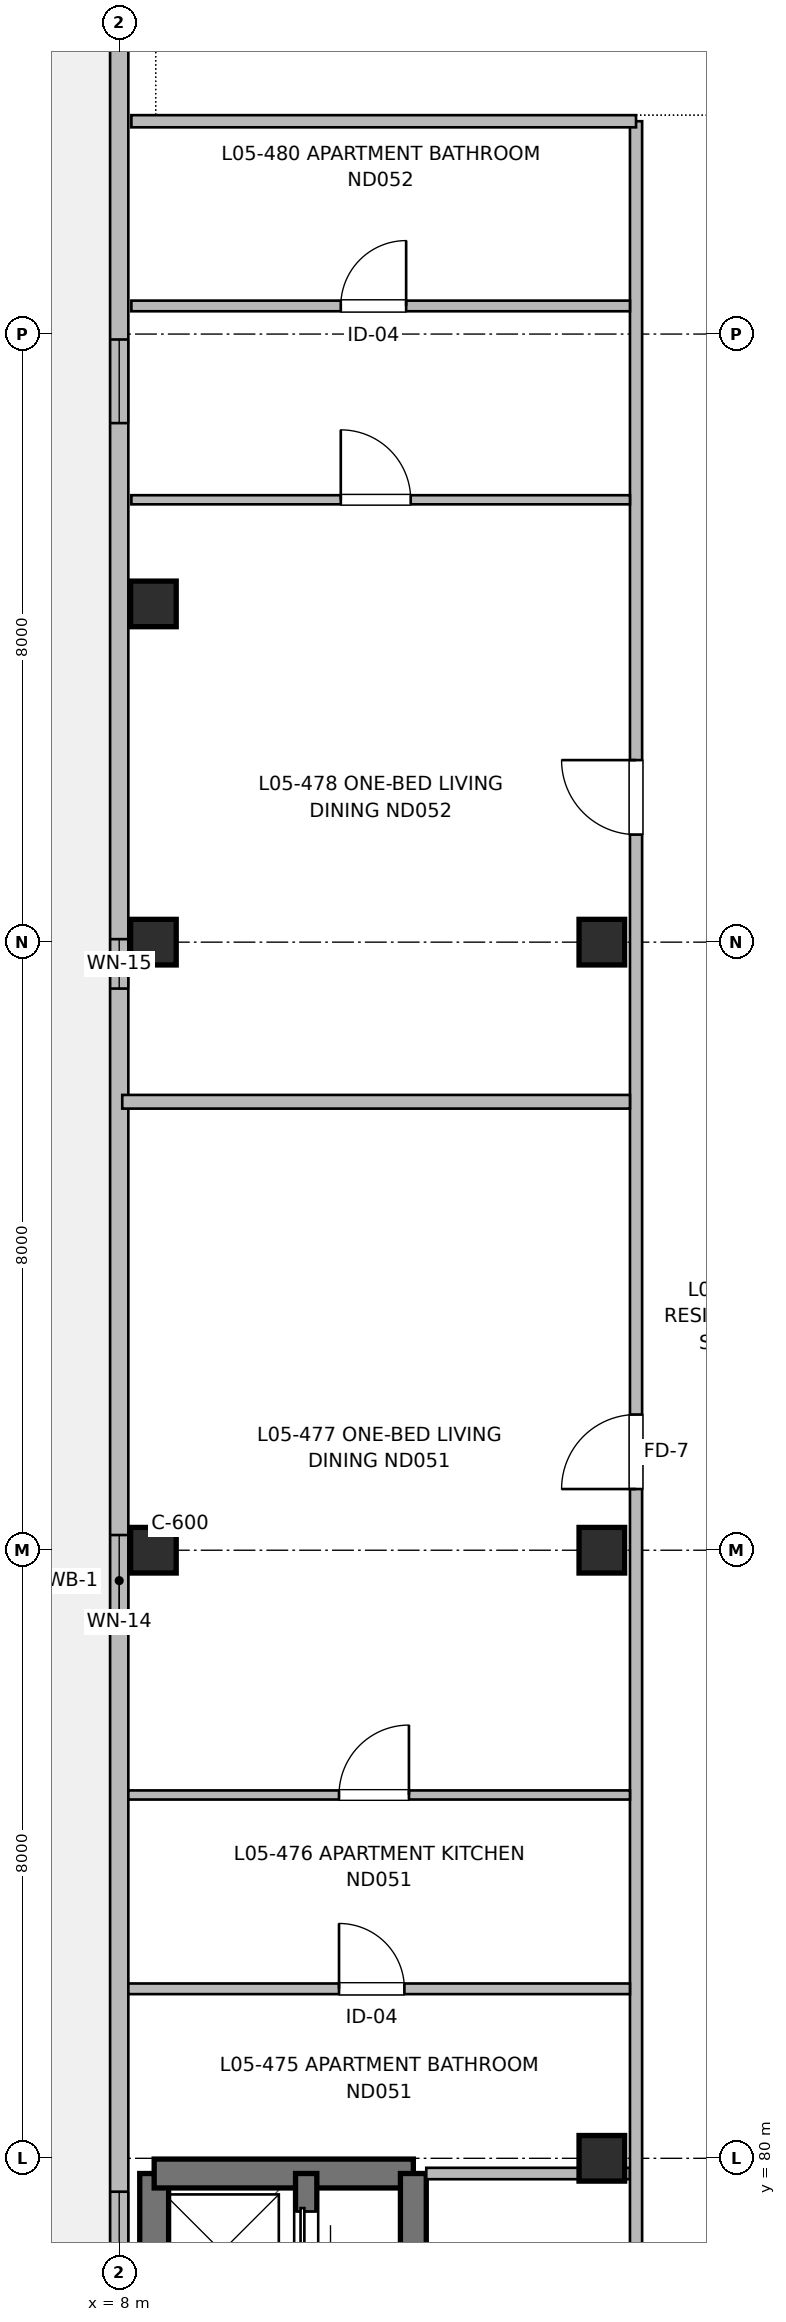
"""IFC4 building model, lengths in metres.
Left out: names, types, materials, properties, quantities, classifications, styles, units other than length and angle.
Written with IfcOpenShell. Run it as: python <this file> out.ifc"""

import sys

from ifc_helpers import new_model, si_unit, direction, frame, frame_2d, origin, origin_2d, place, context, subcontext, project, spatial, rectangle, extrude, element, fill, save


model = new_model("IFC4")
c1 = context("Model", 3, precision=1e-05, world=origin(), true_north=direction((0.0, 1.0)))
c2 = subcontext(c1, "Body", "Model", "MODEL_VIEW")
j1 = project(units=[si_unit("LENGTHUNIT", "METRE"), si_unit("PLANEANGLEUNIT", "RADIAN")], contexts=[c1])
p1 = place(None, origin())
s1 = spatial("IfcSite", under=j1, at=p1, CompositionType="ELEMENT")
p2 = place(p1, origin())
s2 = spatial("IfcBuilding", under=s1, at=p2, CompositionType="ELEMENT")
p3 = place(p2, frame((0.0, 0.0, 16.96)))
s3 = spatial("IfcBuildingStorey", under=s2, at=p3, CompositionType="ELEMENT", Elevation=16.96)
for number, where, z_axis, x_axis in (
    (1, (8.45, 88.0, 0.0), (0.0, 0.0, 1.0), (1.0, 0.0, 0.0)),
    (2, (8.45, 96.0, 0.0), (0.0, 0.0, 1.0), (1.0, 0.0, 0.0)),
    (3, (8.45, 100.45, 0.0), (0.0, 0.0, 1.0), (1.0, 0.0, 0.0)),
    (4, (14.35, 80.0, 0.0), (0.0, 0.0, 1.0), (1.0, 0.0, 0.0)),
    (5, (14.35, 88.0, 0.0), (0.0, 0.0, 1.0), (1.0, 0.0, 0.0)),
    (6, (14.35, 96.0, 0.0), (0.0, 0.0, 1.0), (1.0, 0.0, 0.0)),
):
    element("IfcColumn", number, at=place(p3, frame(where, z_axis=z_axis, x_axis=x_axis)), inside=s3, PredefinedType="COLUMN", context=c2, shape_type="SweptSolid", body=[
        extrude(rectangle(XDim=0.6, YDim=0.6, at=origin_2d()), origin(), (0.0, 0.0, 1.0), 3.2),
    ])
p4 = place(p3, frame((8.46, 67.35, 0.0), z_axis=(0.0, 0.0, 1.0), x_axis=(0.0, 1.0, 0.0)))
e7 = element("IfcWall", 7, at=p4, inside=s3, PredefinedType="SHEAR", context=c2, shape_type="SweptSolid", body=[
    extrude(rectangle(XDim=12.45, YDim=0.38, at=frame_2d((6.225, 0.0))), origin(), (0.0, 0.0, 1.0), 3.2),
])
p5 = place(p4, frame((2.2, 0.0, 0.97)))
e8 = element("IfcOpeningElement", 8, at=p5, cuts=e7, PredefinedType="OPENING", context=c2, shape_type="SweptSolid", body=[
    extrude(rectangle(XDim=0.95, YDim=1.25, at=frame_2d((0.475, 0.625))), frame((0.0, 0.2, 0.0), z_axis=(0.0, -1.0, 0.0), x_axis=(1.0, 0.0, 0.0)), (0.0, 0.0, 1.0), 0.4),
])
p6 = place(p3, frame((8.46, 79.8, 0.0), z_axis=(0.0, 0.0, 1.0), x_axis=(1.0, 0.0, 0.0)))
e9 = element("IfcWall", 9, at=p6, inside=s3, PredefinedType="SHEAR", context=c2, shape_type="SweptSolid", body=[
    extrude(rectangle(XDim=3.41, YDim=0.38, at=frame_2d((1.705, 0.0))), origin(), (0.0, 0.0, 1.0), 3.2),
])
p7 = place(p3, frame((11.87, 79.8, 0.0), z_axis=(0.0, 0.0, 1.0), x_axis=(0.0, -1.0, 0.0)))
e10 = element("IfcWall", 10, at=p7, inside=s3, PredefinedType="SHEAR", context=c2, shape_type="SweptSolid", body=[
    extrude(rectangle(XDim=12.45, YDim=0.34, at=frame_2d((6.225, 0.0))), origin(), (0.0, 0.0, 1.0), 3.2),
])
p8 = place(p7, frame((10.85, 0.0, 0.0)))
e11 = element("IfcOpeningElement", 11, at=p8, cuts=e10, PredefinedType="OPENING", context=c2, shape_type="SweptSolid", body=[
    extrude(rectangle(XDim=1.05, YDim=2.15, at=frame_2d((0.525, 1.075))), frame((0.0, 0.18, 0.0), z_axis=(0.0, -1.0, 0.0), x_axis=(1.0, 0.0, 0.0)), (0.0, 0.0, 1.0), 0.36),
])
p9 = place(p3, frame((10.46, 74.55, 0.0), z_axis=(0.0, 0.0, 1.0), x_axis=(0.0, 1.0, 0.0)))
e12 = element("IfcWall", 12, at=p9, inside=s3, PredefinedType="SHEAR", context=c2, shape_type="SweptSolid", body=[
    extrude(rectangle(XDim=5.25, YDim=0.28, at=frame_2d((2.625, 0.0))), origin(), (0.0, 0.0, 1.0), 3.2),
])
p10 = place(p9, frame((1.15, 0.0, 0.0)))
e13 = element("IfcOpeningElement", 13, at=p10, cuts=e12, PredefinedType="OPENING", context=c2, shape_type="SweptSolid", body=[
    extrude(rectangle(XDim=1.0, YDim=2.15, at=frame_2d((0.5, 1.075))), frame((0.0, 0.15, 0.0), z_axis=(0.0, -1.0, 0.0), x_axis=(1.0, 0.0, 0.0)), (0.0, 0.0, 1.0), 0.3),
])
p11 = place(p9, frame((3.85, 0.0, 0.0)))
e14 = element("IfcOpeningElement", 14, at=p11, cuts=e12, PredefinedType="OPENING", context=c2, shape_type="SweptSolid", body=[
    extrude(rectangle(XDim=0.9, YDim=2.15, at=frame_2d((0.45, 1.075))), frame((0.0, 0.15, 0.0), z_axis=(0.0, -1.0, 0.0), x_axis=(1.0, 0.0, 0.0)), (0.0, 0.0, 1.0), 0.3),
])
p12 = place(p3, frame((8.0, 59.2, 0.0), z_axis=(0.0, 0.0, 1.0), x_axis=(0.0, 1.0, 0.0)))
e15 = element("IfcWall", 15, at=p12, inside=s3, PredefinedType="SOLIDWALL", context=c2, shape_type="SweptSolid", body=[
    extrude(rectangle(XDim=56.8, YDim=0.24, at=frame_2d((28.4, 0.0))), origin(), (0.0, 0.0, 1.0), 2.98),
])
p13 = place(p12, frame((2.657, 0.0, 0.0)))
e16 = element("IfcOpeningElement", 16, at=p13, cuts=e15, PredefinedType="OPENING", context=c2, shape_type="SweptSolid", body=[
    extrude(rectangle(XDim=1.2, YDim=2.2, at=frame_2d((0.6, 1.1))), frame((0.0, 0.13, 0.0), z_axis=(0.0, -1.0, 0.0), x_axis=(1.0, 0.0, 0.0)), (0.0, 0.0, 1.0), 0.26),
])
p14 = place(p12, frame((5.357, 0.0, 0.62)))
e17 = element("IfcOpeningElement", 17, at=p14, cuts=e15, PredefinedType="OPENING", context=c2, shape_type="SweptSolid", body=[
    extrude(rectangle(XDim=1.1, YDim=1.6, at=frame_2d((0.55, 0.8))), frame((0.0, 0.13, 0.0), z_axis=(0.0, -1.0, 0.0), x_axis=(1.0, 0.0, 0.0)), (0.0, 0.0, 1.0), 0.26),
])
p15 = place(p12, frame((11.046, 0.0, 0.72)))
e18 = element("IfcOpeningElement", 18, at=p15, cuts=e15, PredefinedType="OPENING", context=c2, shape_type="SweptSolid", body=[
    extrude(rectangle(XDim=2.25, YDim=1.5, at=frame_2d((1.125, 0.75))), frame((0.0, 0.13, 0.0), z_axis=(0.0, -1.0, 0.0), x_axis=(1.0, 0.0, 0.0)), (0.0, 0.0, 1.0), 0.26),
])
p16 = place(p12, frame((19.311, 0.0, 0.9)))
e19 = element("IfcOpeningElement", 19, at=p16, cuts=e15, PredefinedType="OPENING", context=c2, shape_type="SweptSolid", body=[
    extrude(rectangle(XDim=1.05, YDim=1.15, at=frame_2d((0.525, 0.575))), frame((0.0, 0.13, 0.0), z_axis=(0.0, -1.0, 0.0), x_axis=(1.0, 0.0, 0.0)), (0.0, 0.0, 1.0), 0.26),
])
p17 = place(p12, frame((27.8, 0.0, 0.9)))
e20 = element("IfcOpeningElement", 20, at=p17, cuts=e15, PredefinedType="OPENING", context=c2, shape_type="SweptSolid", body=[
    extrude(rectangle(XDim=1.2, YDim=1.05, at=frame_2d((0.6, 0.525))), frame((0.0, 0.13, 0.0), z_axis=(0.0, -1.0, 0.0), x_axis=(1.0, 0.0, 0.0)), (0.0, 0.0, 1.0), 0.26),
])
p18 = place(p12, frame((36.189, 0.0, 0.9)))
e21 = element("IfcOpeningElement", 21, at=p18, cuts=e15, PredefinedType="OPENING", context=c2, shape_type="SweptSolid", body=[
    extrude(rectangle(XDim=0.65, YDim=0.95, at=frame_2d((0.325, 0.475))), frame((0.0, 0.13, 0.0), z_axis=(0.0, -1.0, 0.0), x_axis=(1.0, 0.0, 0.0)), (0.0, 0.0, 1.0), 0.26),
])
p19 = place(p12, frame((43.629, 0.0, 0.62)))
e22 = element("IfcOpeningElement", 22, at=p19, cuts=e15, PredefinedType="OPENING", context=c2, shape_type="SweptSolid", body=[
    extrude(rectangle(XDim=1.1, YDim=1.6, at=frame_2d((0.55, 0.8))), frame((0.0, 0.13, 0.0), z_axis=(0.0, -1.0, 0.0), x_axis=(1.0, 0.0, 0.0)), (0.0, 0.0, 1.0), 0.26),
])
p20 = place(p12, frame((52.693, 0.0, 0.47)))
e23 = element("IfcOpeningElement", 23, at=p20, cuts=e15, PredefinedType="OPENING", context=c2, shape_type="SweptSolid", body=[
    extrude(rectangle(XDim=2.7, YDim=1.75, at=frame_2d((1.35, 0.875))), frame((0.0, 0.13, 0.0), z_axis=(0.0, -1.0, 0.0), x_axis=(1.0, 0.0, 0.0)), (0.0, 0.0, 1.0), 0.26),
])
p21 = place(p3, frame((12.04, 79.8, 0.0), z_axis=(0.0, 0.0, 1.0), x_axis=(1.0, 0.0, 0.0)))
e24 = element("IfcWall", 24, at=p21, inside=s3, PredefinedType="PARTITIONING", context=c2, shape_type="SweptSolid", body=[
    extrude(rectangle(XDim=2.68, YDim=0.15, at=frame_2d((1.34, 0.0))), origin(), (0.0, 0.0, 1.0), 2.935),
])
p22 = place(p3, frame((14.8, 59.36, 0.0), z_axis=(0.0, 0.0, 1.0), x_axis=(0.0, 1.0, 0.0)))
e25 = element("IfcWall", 25, at=p22, inside=s3, PredefinedType="PARTITIONING", context=c2, shape_type="SweptSolid", body=[
    extrude(rectangle(XDim=47.44, YDim=0.16, at=frame_2d((23.72, 0.0))), origin(), (0.0, 0.0, 1.0), 2.935),
])
p23 = place(p22, frame((9.64, 0.0, 0.0)))
e26 = element("IfcOpeningElement", 26, at=p23, cuts=e25, PredefinedType="OPENING", context=c2, shape_type="SweptSolid", body=[
    extrude(rectangle(XDim=1.1, YDim=2.15, at=frame_2d((0.55, 1.075))), frame((0.0, 0.09, 0.0), z_axis=(0.0, -1.0, 0.0), x_axis=(1.0, 0.0, 0.0)), (0.0, 0.0, 1.0), 0.18),
])
p24 = place(p22, frame((16.04, 0.0, 0.0)))
e27 = element("IfcOpeningElement", 27, at=p24, cuts=e25, PredefinedType="OPENING", context=c2, shape_type="SweptSolid", body=[
    extrude(rectangle(XDim=1.6, YDim=2.15, at=frame_2d((0.8, 1.075))), frame((0.0, 0.09, 0.0), z_axis=(0.0, -1.0, 0.0), x_axis=(1.0, 0.0, 0.0)), (0.0, 0.0, 1.0), 0.18),
])
p25 = place(p22, frame((1.8, 0.0, 0.0)))
e28 = element("IfcOpeningElement", 28, at=p25, cuts=e25, PredefinedType="OPENING", context=c2, shape_type="SweptSolid", body=[
    extrude(rectangle(XDim=0.96, YDim=2.15, at=frame_2d((0.48, 1.075))), frame((0.0, 0.09, 0.0), z_axis=(0.0, -1.0, 0.0), x_axis=(1.0, 0.0, 0.0)), (0.0, 0.0, 1.0), 0.18),
])
p26 = place(p22, frame((29.445, 0.0, 0.0)))
e29 = element("IfcOpeningElement", 29, at=p26, cuts=e25, PredefinedType="OPENING", context=c2, shape_type="SweptSolid", body=[
    extrude(rectangle(XDim=0.98, YDim=2.15, at=frame_2d((0.49, 1.075))), frame((0.0, 0.09, 0.0), z_axis=(0.0, -1.0, 0.0), x_axis=(1.0, 0.0, 0.0)), (0.0, 0.0, 1.0), 0.18),
])
p27 = place(p22, frame((38.055, 0.0, 0.0)))
e30 = element("IfcOpeningElement", 30, at=p27, cuts=e25, PredefinedType="OPENING", context=c2, shape_type="SweptSolid", body=[
    extrude(rectangle(XDim=0.98, YDim=2.15, at=frame_2d((0.49, 1.075))), frame((0.0, 0.09, 0.0), z_axis=(0.0, -1.0, 0.0), x_axis=(1.0, 0.0, 0.0)), (0.0, 0.0, 1.0), 0.18),
])
p28 = place(p3, frame((8.16, 106.8, 0.0), z_axis=(0.0, 0.0, 1.0), x_axis=(1.0, 0.0, 0.0)))
e31 = element("IfcWall", 31, at=p28, inside=s3, PredefinedType="PARTITIONING", context=c2, shape_type="SweptSolid", body=[
    extrude(rectangle(XDim=6.64, YDim=0.16, at=frame_2d((3.32, 0.0))), origin(), (0.0, 0.0, 1.0), 2.935),
])
p29 = place(p3, frame((8.04, 93.9, 0.0), z_axis=(0.0, 0.0, 1.0), x_axis=(1.0, 0.0, 0.0)))
e32 = element("IfcWall", 32, at=p29, inside=s3, PredefinedType="PARTITIONING", context=c2, shape_type="SweptSolid", body=[
    extrude(rectangle(XDim=6.68, YDim=0.18, at=frame_2d((3.34, 0.0))), origin(), (0.0, 0.0, 1.0), 2.935),
])
p30 = place(p3, frame((8.12, 82.23, 0.0), z_axis=(0.0, 0.0, 1.0), x_axis=(1.0, 0.0, 0.0)))
e33 = element("IfcWall", 33, at=p30, inside=s3, PredefinedType="PARTITIONING", context=c2, shape_type="SweptSolid", body=[
    extrude(rectangle(XDim=6.6, YDim=0.14, at=frame_2d((3.3, 0.0))), origin(), (0.0, 0.0, 1.0), 2.935),
])
p31 = place(p30, frame((2.772, 0.0, 0.0)))
e34 = element("IfcOpeningElement", 34, at=p31, cuts=e33, PredefinedType="OPENING", context=c2, shape_type="SweptSolid", body=[
    extrude(rectangle(XDim=0.86, YDim=2.1, at=frame_2d((0.43, 1.05))), frame((0.0, 0.08, 0.0), z_axis=(0.0, -1.0, 0.0), x_axis=(1.0, 0.0, 0.0)), (0.0, 0.0, 1.0), 0.16),
])
p32 = place(p3, frame((8.12, 84.78, 0.0), z_axis=(0.0, 0.0, 1.0), x_axis=(1.0, 0.0, 0.0)))
e35 = element("IfcWall", 35, at=p32, inside=s3, PredefinedType="PARTITIONING", context=c2, shape_type="SweptSolid", body=[
    extrude(rectangle(XDim=6.6, YDim=0.12, at=frame_2d((3.3, 0.0))), origin(), (0.0, 0.0, 1.0), 2.935),
])
p33 = place(p32, frame((2.772, 0.0, 0.0)))
e36 = element("IfcOpeningElement", 36, at=p33, cuts=e35, PredefinedType="OPENING", context=c2, shape_type="SweptSolid", body=[
    extrude(rectangle(XDim=0.92, YDim=2.1, at=frame_2d((0.46, 1.05))), frame((0.0, 0.07, 0.0), z_axis=(0.0, -1.0, 0.0), x_axis=(1.0, 0.0, 0.0)), (0.0, 0.0, 1.0), 0.14),
])
p34 = place(p3, frame((8.16, 101.82, 0.0), z_axis=(0.0, 0.0, 1.0), x_axis=(1.0, 0.0, 0.0)))
e37 = element("IfcWall", 37, at=p34, inside=s3, PredefinedType="PARTITIONING", context=c2, shape_type="SweptSolid", body=[
    extrude(rectangle(XDim=6.56, YDim=0.12, at=frame_2d((3.28, 0.0))), origin(), (0.0, 0.0, 1.0), 2.935),
])
p35 = place(p34, frame((2.755, 0.0, 0.0)))
e38 = element("IfcOpeningElement", 38, at=p35, cuts=e37, PredefinedType="OPENING", context=c2, shape_type="SweptSolid", body=[
    extrude(rectangle(XDim=0.92, YDim=2.1, at=frame_2d((0.46, 1.05))), frame((0.0, 0.07, 0.0), z_axis=(0.0, -1.0, 0.0), x_axis=(1.0, 0.0, 0.0)), (0.0, 0.0, 1.0), 0.14),
])
p36 = place(p3, frame((8.16, 104.37, 0.0), z_axis=(0.0, 0.0, 1.0), x_axis=(1.0, 0.0, 0.0)))
e39 = element("IfcWall", 39, at=p36, inside=s3, PredefinedType="PARTITIONING", context=c2, shape_type="SweptSolid", body=[
    extrude(rectangle(XDim=6.56, YDim=0.14, at=frame_2d((3.28, 0.0))), origin(), (0.0, 0.0, 1.0), 2.935),
])
p37 = place(p36, frame((2.755, 0.0, 0.0)))
e40 = element("IfcOpeningElement", 40, at=p37, cuts=e39, PredefinedType="OPENING", context=c2, shape_type="SweptSolid", body=[
    extrude(rectangle(XDim=0.86, YDim=2.1, at=frame_2d((0.43, 1.05))), frame((0.0, 0.08, 0.0), z_axis=(0.0, -1.0, 0.0), x_axis=(1.0, 0.0, 0.0)), (0.0, 0.0, 1.0), 0.16),
])
p38 = place(p11, origin())
e41 = element("IfcDoor", 41, at=p38, inside=s3, OperationType="SLIDING_TO_RIGHT", PredefinedType="DOOR", context=c2, shape_type="SweptSolid", body=[
    extrude(rectangle(XDim=0.9, YDim=2.15, at=frame_2d((0.45, 1.075))), frame((0.0, 0.025, 0.0), z_axis=(0.0, -1.0, 0.0), x_axis=(1.0, 0.0, 0.0)), (0.0, 0.0, 1.0), 0.05),
])
fill(e14, e41)
p39 = place(p16, origin())
e42 = element("IfcWindow", 42, at=p39, inside=s3, PartitioningType="SINGLE_PANEL", PredefinedType="WINDOW", context=c2, shape_type="SweptSolid", body=[
    extrude(rectangle(XDim=1.05, YDim=1.15, at=frame_2d((0.525, 0.575))), frame((0.0, 0.03, 0.0), z_axis=(0.0, -1.0, 0.0), x_axis=(1.0, 0.0, 0.0)), (0.0, 0.0, 1.0), 0.06),
])
fill(e19, e42)
p40 = place(p17, origin())
e43 = element("IfcWindow", 43, at=p40, inside=s3, PartitioningType="SINGLE_PANEL", PredefinedType="WINDOW", context=c2, shape_type="SweptSolid", body=[
    extrude(rectangle(XDim=1.2, YDim=1.05, at=frame_2d((0.6, 0.525))), frame((0.0, 0.03, 0.0), z_axis=(0.0, -1.0, 0.0), x_axis=(1.0, 0.0, 0.0)), (0.0, 0.0, 1.0), 0.06),
])
fill(e20, e43)
p41 = place(p18, origin())
e44 = element("IfcWindow", 44, at=p41, inside=s3, PartitioningType="SINGLE_PANEL", PredefinedType="WINDOW", context=c2, shape_type="SweptSolid", body=[
    extrude(rectangle(XDim=0.65, YDim=0.95, at=frame_2d((0.325, 0.475))), frame((0.0, 0.03, 0.0), z_axis=(0.0, -1.0, 0.0), x_axis=(1.0, 0.0, 0.0)), (0.0, 0.0, 1.0), 0.06),
])
fill(e21, e44)
p42 = place(p19, origin())
e45 = element("IfcWindow", 45, at=p42, inside=s3, PartitioningType="SINGLE_PANEL", PredefinedType="WINDOW", context=c2, shape_type="SweptSolid", body=[
    extrude(rectangle(XDim=1.1, YDim=1.6, at=frame_2d((0.55, 0.8))), frame((0.0, 0.03, 0.0), z_axis=(0.0, -1.0, 0.0), x_axis=(1.0, 0.0, 0.0)), (0.0, 0.0, 1.0), 0.06),
])
fill(e22, e45)
p43 = place(p31, origin())
e46 = element("IfcDoor", 46, at=p43, inside=s3, OperationType="SINGLE_SWING_LEFT", PredefinedType="DOOR", context=c2, shape_type="SweptSolid", body=[
    extrude(rectangle(XDim=0.86, YDim=2.1, at=frame_2d((0.43, 1.05))), frame((0.0, 0.025, 0.0), z_axis=(0.0, -1.0, 0.0), x_axis=(1.0, 0.0, 0.0)), (0.0, 0.0, 1.0), 0.05),
])
fill(e34, e46)
p44 = place(p33, origin())
e47 = element("IfcDoor", 47, at=p44, inside=s3, OperationType="SINGLE_SWING_RIGHT", PredefinedType="DOOR", context=c2, shape_type="SweptSolid", body=[
    extrude(rectangle(XDim=0.92, YDim=2.1, at=frame_2d((0.46, 1.05))), frame((0.0, 0.025, 0.0), z_axis=(0.0, -1.0, 0.0), x_axis=(1.0, 0.0, 0.0)), (0.0, 0.0, 1.0), 0.05),
])
fill(e36, e47)
p45 = place(p26, origin())
e48 = element("IfcDoor", 48, at=p45, inside=s3, OperationType="SINGLE_SWING_LEFT", PredefinedType="DOOR", context=c2, shape_type="SweptSolid", body=[
    extrude(rectangle(XDim=0.98, YDim=2.15, at=frame_2d((0.49, 1.075))), frame((0.0, 0.025, 0.0), z_axis=(0.0, -1.0, 0.0), x_axis=(1.0, 0.0, 0.0)), (0.0, 0.0, 1.0), 0.05),
])
fill(e29, e48)
p46 = place(p37, origin())
e49 = element("IfcDoor", 49, at=p46, inside=s3, OperationType="SINGLE_SWING_RIGHT", PredefinedType="DOOR", context=c2, shape_type="SweptSolid", body=[
    extrude(rectangle(XDim=0.86, YDim=2.1, at=frame_2d((0.43, 1.05))), frame((0.0, 0.025, 0.0), z_axis=(0.0, -1.0, 0.0), x_axis=(1.0, 0.0, 0.0)), (0.0, 0.0, 1.0), 0.05),
])
fill(e40, e49)
p47 = place(p35, origin())
e50 = element("IfcDoor", 50, at=p47, inside=s3, OperationType="SINGLE_SWING_LEFT", PredefinedType="DOOR", context=c2, shape_type="SweptSolid", body=[
    extrude(rectangle(XDim=0.92, YDim=2.1, at=frame_2d((0.46, 1.05))), frame((0.0, 0.025, 0.0), z_axis=(0.0, -1.0, 0.0), x_axis=(1.0, 0.0, 0.0)), (0.0, 0.0, 1.0), 0.05),
])
fill(e38, e50)
p48 = place(p27, origin())
e51 = element("IfcDoor", 51, at=p48, inside=s3, OperationType="SINGLE_SWING_RIGHT", PredefinedType="DOOR", context=c2, shape_type="SweptSolid", body=[
    extrude(rectangle(XDim=0.98, YDim=2.15, at=frame_2d((0.49, 1.075))), frame((0.0, 0.025, 0.0), z_axis=(0.0, -1.0, 0.0), x_axis=(1.0, 0.0, 0.0)), (0.0, 0.0, 1.0), 0.05),
])
fill(e30, e51)
save(model, sys.argv[1])
